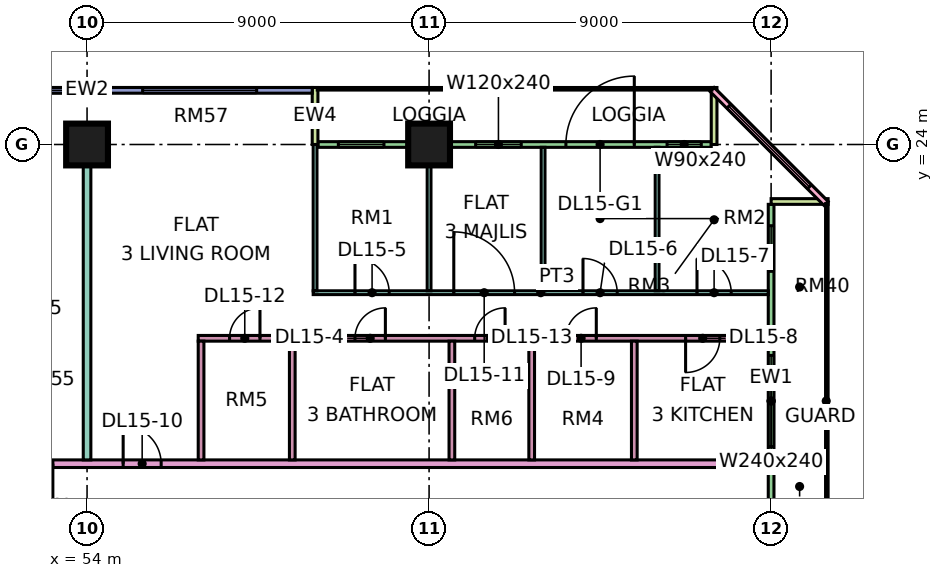
"""IFC4 building model, lengths in metres.
Left out: names, types, materials, properties, quantities, classifications, styles, units other than length and angle.
Written with IfcOpenShell. Run it as: python <this file> out.ifc"""

import sys

from ifc_helpers import new_model, si_unit, direction, frame, frame_2d, origin, origin_2d, place, context, subcontext, project, spatial, rectangle, extrude, element, fill, save


model = new_model("IFC4")
c1 = context("Model", 3, precision=1e-05, world=origin(), true_north=direction((0.0, 1.0)))
c2 = subcontext(c1, "Body", "Model", "MODEL_VIEW")
j1 = project(units=[si_unit("LENGTHUNIT", "METRE"), si_unit("PLANEANGLEUNIT", "RADIAN")], contexts=[c1])
p1 = place(None, origin())
s1 = spatial("IfcSite", under=j1, at=p1, CompositionType="ELEMENT")
p2 = place(p1, origin())
s2 = spatial("IfcBuilding", under=s1, at=p2, CompositionType="ELEMENT")
p3 = place(p2, frame((0.0, 0.0, 71.4)))
s3 = spatial("IfcBuildingStorey", under=s2, at=p3, CompositionType="ELEMENT", Elevation=71.4)
for number, where, z_axis, x_axis in (
    (1, (54.0, 24.0, 0.0), (0.0, 0.0, 1.0), (1.0, 0.0, 0.0)),
    (2, (63.0, 24.0, 0.0), (0.0, 0.0, 1.0), (1.0, 0.0, 0.0)),
):
    element("IfcColumn", number, at=place(p3, frame(where, z_axis=z_axis, x_axis=x_axis)), inside=s3, PredefinedType="COLUMN", context=c2, shape_type="SweptSolid", body=[
        extrude(rectangle(XDim=1.1, YDim=1.1, at=origin_2d()), origin(), (0.0, 0.0, 1.0), 3.75),
    ])
p4 = place(p3, frame((70.425, 24.0, 0.0), z_axis=(0.0, 0.0, 1.0), x_axis=(-1.0, 0.0, 0.0)))
e3 = element("IfcWall", 3, at=p4, inside=s3, PredefinedType="SOLIDWALL", context=c2, shape_type="SweptSolid", body=[
    extrude(rectangle(XDim=10.35, YDim=0.15, at=frame_2d((5.175, 0.0))), origin(), (0.0, 0.0, 1.0), 3.35),
])
p5 = place(p4, frame((0.262, 0.0, 0.45)))
e4 = element("IfcOpeningElement", 4, at=p5, cuts=e3, PredefinedType="OPENING", context=c2, shape_type="SweptSolid", body=[
    extrude(rectangle(XDim=0.9, YDim=2.4, at=frame_2d((0.45, 1.2))), frame((0.0, 0.085, 0.0), z_axis=(0.0, -1.0, 0.0), x_axis=(1.0, 0.0, 0.0)), (0.0, 0.0, 1.0), 0.17),
])
p6 = place(p4, frame((2.025, 0.0, 0.0)))
e5 = element("IfcOpeningElement", 5, at=p6, cuts=e3, PredefinedType="OPENING", context=c2, shape_type="SweptSolid", body=[
    extrude(rectangle(XDim=1.8, YDim=2.4, at=frame_2d((0.9, 1.2))), frame((0.0, 0.085, 0.0), z_axis=(0.0, -1.0, 0.0), x_axis=(1.0, 0.0, 0.0)), (0.0, 0.0, 1.0), 0.17),
])
p7 = place(p4, frame((5.0, 0.0, 0.45)))
e6 = element("IfcOpeningElement", 6, at=p7, cuts=e3, PredefinedType="OPENING", context=c2, shape_type="SweptSolid", body=[
    extrude(rectangle(XDim=1.2, YDim=2.4, at=frame_2d((0.6, 1.2))), frame((0.0, 0.085, 0.0), z_axis=(0.0, -1.0, 0.0), x_axis=(1.0, 0.0, 0.0)), (0.0, 0.0, 1.0), 0.17),
])
p8 = place(p4, frame((8.613, 0.0, 0.45)))
e7 = element("IfcOpeningElement", 7, at=p8, cuts=e3, PredefinedType="OPENING", context=c2, shape_type="SweptSolid", body=[
    extrude(rectangle(XDim=1.2, YDim=2.4, at=frame_2d((0.6, 1.2))), frame((0.0, 0.085, 0.0), z_axis=(0.0, -1.0, 0.0), x_axis=(1.0, 0.0, 0.0)), (0.0, 0.0, 1.0), 0.17),
])
for number, where, z_axis, x_axis in (
    (8, (70.5, 25.5, 0.0), (0.0, 0.0, 1.0), (0.0, -1.0, 0.0)),
    (9, (60.0, 25.5, 0.0), (0.0, 0.0, 1.0), (0.0, -1.0, 0.0)),
):
    element("IfcWall", number, at=place(p3, frame(where, z_axis=z_axis, x_axis=x_axis)), inside=s3, PredefinedType="SOLIDWALL", context=c2, shape_type="SweptSolid", body=[
        extrude(rectangle(XDim=1.5, YDim=0.15, at=frame_2d((0.75, 0.0))), origin(), (0.0, 0.0, 1.0), 3.35),
    ])
p9 = place(p3, frame((59.925, 25.425, 0.0), z_axis=(0.0, 0.0, 1.0), x_axis=(-1.0, 0.0, 0.0)))
e10 = element("IfcWall", 10, at=p9, inside=s3, PredefinedType="SOLIDWALL", context=c2, shape_type="SweptSolid", body=[
    extrude(rectangle(XDim=11.85, YDim=0.15, at=frame_2d((5.925, 0.0))), origin(), (0.0, 0.0, 1.0), 3.35),
])
p10 = place(p9, frame((1.462, 0.0, 0.45)))
e11 = element("IfcOpeningElement", 11, at=p10, cuts=e10, PredefinedType="OPENING", context=c2, shape_type="SweptSolid", body=[
    extrude(rectangle(XDim=3.0, YDim=2.4, at=frame_2d((1.5, 1.2))), frame((0.0, 0.085, 0.0), z_axis=(0.0, -1.0, 0.0), x_axis=(1.0, 0.0, 0.0)), (0.0, 0.0, 1.0), 0.17),
])
p11 = place(p9, frame((6.488, 0.0, 0.45)))
e12 = element("IfcOpeningElement", 12, at=p11, cuts=e10, PredefinedType="OPENING", context=c2, shape_type="SweptSolid", body=[
    extrude(rectangle(XDim=4.8, YDim=2.4, at=frame_2d((2.4, 1.2))), frame((0.0, 0.085, 0.0), z_axis=(0.0, -1.0, 0.0), x_axis=(1.0, 0.0, 0.0)), (0.0, 0.0, 1.0), 0.17),
])
p12 = place(p3, frame((72.0, 12.075, 0.0), z_axis=(0.0, 0.0, 1.0), x_axis=(0.0, 1.0, 0.0)))
e13 = element("IfcWall", 13, at=p12, inside=s3, PredefinedType="SOLIDWALL", context=c2, shape_type="SweptSolid", body=[
    extrude(rectangle(XDim=10.35, YDim=0.15, at=frame_2d((5.175, 0.0))), origin(), (0.0, 0.0, 1.0), 3.35),
])
p13 = place(p12, frame((3.975, 0.0, 0.45)))
e14 = element("IfcOpeningElement", 14, at=p13, cuts=e13, PredefinedType="OPENING", context=c2, shape_type="SweptSolid", body=[
    extrude(rectangle(XDim=2.4, YDim=2.4, at=frame_2d((1.2, 1.2))), frame((0.0, 0.085, 0.0), z_axis=(0.0, -1.0, 0.0), x_axis=(1.0, 0.0, 0.0)), (0.0, 0.0, 1.0), 0.17),
])
p14 = place(p12, frame((8.587, 0.0, 0.45)))
e15 = element("IfcOpeningElement", 15, at=p14, cuts=e13, PredefinedType="OPENING", context=c2, shape_type="SweptSolid", body=[
    extrude(rectangle(XDim=1.2, YDim=2.4, at=frame_2d((0.6, 1.2))), frame((0.0, 0.085, 0.0), z_axis=(0.0, -1.0, 0.0), x_axis=(1.0, 0.0, 0.0)), (0.0, 0.0, 1.0), 0.17),
])
p15 = place(p3, frame((73.5, 22.5, 0.0), z_axis=(0.0, 0.0, 1.0), x_axis=(-1.0, 0.0, 0.0)))
e16 = element("IfcWall", 16, at=p15, inside=s3, PredefinedType="SOLIDWALL", context=c2, shape_type="SweptSolid", body=[
    extrude(rectangle(XDim=1.5, YDim=0.15, at=frame_2d((0.75, 0.0))), origin(), (0.0, 0.0, 1.0), 3.35),
])
p16 = place(p3, frame((73.447, 22.447, 0.0), z_axis=(0.0, 0.0, 1.0), x_axis=(-0.707106781187, 0.707106781187, 0.0)))
e17 = element("IfcWall", 17, at=p16, inside=s3, PredefinedType="SOLIDWALL", context=c2, shape_type="SweptSolid", body=[
    extrude(rectangle(XDim=4.243, YDim=0.15, at=frame_2d((2.121, 0.0))), origin(), (0.0, 0.0, 1.0), 3.35),
])
p17 = place(p16, frame((0.621, 0.0, 0.45)))
e18 = element("IfcOpeningElement", 18, at=p17, cuts=e17, PredefinedType="OPENING", context=c2, shape_type="SweptSolid", body=[
    extrude(rectangle(XDim=3.0, YDim=2.4, at=frame_2d((1.5, 1.2))), frame((0.0, 0.085, 0.0), z_axis=(0.0, -1.0, 0.0), x_axis=(1.0, 0.0, 0.0)), (0.0, 0.0, 1.0), 0.17),
])
p18 = place(p3, frame((51.225, 15.6, 0.0), z_axis=(0.0, 0.0, 1.0), x_axis=(1.0, 0.0, 0.0)))
e19 = element("IfcWall", 19, at=p18, inside=s3, PredefinedType="PARTITIONING", context=c2, shape_type="SweptSolid", body=[
    extrude(rectangle(XDim=20.701, YDim=0.2, at=frame_2d((10.351, 0.0))), origin(), (0.0, 0.0, 1.0), 3.35),
])
p19 = place(p18, frame((3.725, 0.0, 0.0)))
e20 = element("IfcOpeningElement", 20, at=p19, cuts=e19, PredefinedType="OPENING", context=c2, shape_type="SweptSolid", body=[
    extrude(rectangle(XDim=1.0, YDim=2.1, at=frame_2d((0.5, 1.05))), frame((0.0, 0.11, 0.0), z_axis=(0.0, -1.0, 0.0), x_axis=(1.0, 0.0, 0.0)), (0.0, 0.0, 1.0), 0.22),
])
p20 = place(p18, frame((0.875, 0.0, 0.0)))
e21 = element("IfcOpeningElement", 21, at=p20, cuts=e19, PredefinedType="OPENING", context=c2, shape_type="SweptSolid", body=[
    extrude(rectangle(XDim=1.0, YDim=2.1, at=frame_2d((0.5, 1.05))), frame((0.0, 0.11, 0.0), z_axis=(0.0, -1.0, 0.0), x_axis=(1.0, 0.0, 0.0)), (0.0, 0.0, 1.0), 0.22),
])
p21 = place(p3, frame((54.0, 15.7, 0.0), z_axis=(0.0, 0.0, 1.0), x_axis=(0.0, 1.0, 0.0)))
e22 = element("IfcWall", 22, at=p21, inside=s3, PredefinedType="PARTITIONING", context=c2, shape_type="SweptSolid", body=[
    extrude(rectangle(XDim=8.3, YDim=0.2, at=frame_2d((4.15, 0.0))), origin(), (0.0, 0.0, 1.0), 3.35),
])
p22 = place(p3, frame((56.925, 18.9, 0.0), z_axis=(0.0, 0.0, 1.0), x_axis=(1.0, 0.0, 0.0)))
e23 = element("IfcWall", 23, at=p22, inside=s3, PredefinedType="PARTITIONING", context=c2, shape_type="SweptSolid", body=[
    extrude(rectangle(XDim=15.001, YDim=0.15, at=frame_2d((7.5, 0.0))), origin(), (0.0, 0.0, 1.0), 3.35),
])
p23 = place(p22, frame((4.125, 0.0, 0.0)))
e24 = element("IfcOpeningElement", 24, at=p23, cuts=e23, PredefinedType="OPENING", context=c2, shape_type="SweptSolid", body=[
    extrude(rectangle(XDim=0.8, YDim=2.1, at=frame_2d((0.4, 1.05))), frame((0.0, 0.085, 0.0), z_axis=(0.0, -1.0, 0.0), x_axis=(1.0, 0.0, 0.0)), (0.0, 0.0, 1.0), 0.17),
])
p24 = place(p22, frame((12.825, 0.0, 0.0)))
e25 = element("IfcOpeningElement", 25, at=p24, cuts=e23, PredefinedType="OPENING", context=c2, shape_type="SweptSolid", body=[
    extrude(rectangle(XDim=0.9, YDim=2.1, at=frame_2d((0.45, 1.05))), frame((0.0, 0.085, 0.0), z_axis=(0.0, -1.0, 0.0), x_axis=(1.0, 0.0, 0.0)), (0.0, 0.0, 1.0), 0.17),
])
p25 = place(p22, frame((9.675, 0.0, 0.0)))
e26 = element("IfcOpeningElement", 26, at=p25, cuts=e23, PredefinedType="OPENING", context=c2, shape_type="SweptSolid", body=[
    extrude(rectangle(XDim=0.8, YDim=2.1, at=frame_2d((0.4, 1.05))), frame((0.0, 0.085, 0.0), z_axis=(0.0, -1.0, 0.0), x_axis=(1.0, 0.0, 0.0)), (0.0, 0.0, 1.0), 0.17),
])
p26 = place(p22, frame((0.825, 0.0, 0.0)))
e27 = element("IfcOpeningElement", 27, at=p26, cuts=e23, PredefinedType="OPENING", context=c2, shape_type="SweptSolid", body=[
    extrude(rectangle(XDim=0.8, YDim=2.1, at=frame_2d((0.4, 1.05))), frame((0.0, 0.085, 0.0), z_axis=(0.0, -1.0, 0.0), x_axis=(1.0, 0.0, 0.0)), (0.0, 0.0, 1.0), 0.17),
])
p27 = place(p22, frame((7.275, 0.0, 0.0)))
e28 = element("IfcOpeningElement", 28, at=p27, cuts=e23, PredefinedType="OPENING", context=c2, shape_type="SweptSolid", body=[
    extrude(rectangle(XDim=0.8, YDim=2.1, at=frame_2d((0.4, 1.05))), frame((0.0, 0.085, 0.0), z_axis=(0.0, -1.0, 0.0), x_axis=(1.0, 0.0, 0.0)), (0.0, 0.0, 1.0), 0.17),
])
for number, where, z_axis, x_axis in (
    (29, (57.0, 15.7, 0.0), (0.0, 0.0, 1.0), (0.0, 1.0, 0.0)),
    (30, (59.4, 15.7, 0.0), (0.0, 0.0, 1.0), (0.0, 1.0, 0.0)),
):
    element("IfcWall", number, at=place(p3, frame(where, z_axis=z_axis, x_axis=x_axis)), inside=s3, PredefinedType="PARTITIONING", context=c2, shape_type="SweptSolid", body=[
        extrude(rectangle(XDim=3.125, YDim=0.15, at=frame_2d((1.562, 0.0))), origin(), (0.0, 0.0, 1.0), 3.35),
    ])
p28 = place(p3, frame((59.95, 20.1, 0.0), z_axis=(0.0, 0.0, 1.0), x_axis=(1.0, 0.0, 0.0)))
e31 = element("IfcWall", 31, at=p28, inside=s3, PredefinedType="PARTITIONING", context=c2, shape_type="SweptSolid", body=[
    extrude(rectangle(XDim=11.976, YDim=0.1, at=frame_2d((5.988, 0.0))), origin(), (0.0, 0.0, 1.0), 3.35),
])
p29 = place(p28, frame((1.1, 0.0, 0.0)))
e32 = element("IfcOpeningElement", 32, at=p29, cuts=e31, PredefinedType="OPENING", context=c2, shape_type="SweptSolid", body=[
    extrude(rectangle(XDim=0.9, YDim=2.1, at=frame_2d((0.45, 1.05))), frame((0.0, 0.06, 0.0), z_axis=(0.0, -1.0, 0.0), x_axis=(1.0, 0.0, 0.0)), (0.0, 0.0, 1.0), 0.12),
])
p30 = place(p28, frame((7.1, 0.0, 0.0)))
e33 = element("IfcOpeningElement", 33, at=p30, cuts=e31, PredefinedType="OPENING", context=c2, shape_type="SweptSolid", body=[
    extrude(rectangle(XDim=0.9, YDim=2.1, at=frame_2d((0.45, 1.05))), frame((0.0, 0.06, 0.0), z_axis=(0.0, -1.0, 0.0), x_axis=(1.0, 0.0, 0.0)), (0.0, 0.0, 1.0), 0.12),
])
p31 = place(p28, frame((10.1, 0.0, 0.0)))
e34 = element("IfcOpeningElement", 34, at=p31, cuts=e31, PredefinedType="OPENING", context=c2, shape_type="SweptSolid", body=[
    extrude(rectangle(XDim=0.9, YDim=2.1, at=frame_2d((0.45, 1.05))), frame((0.0, 0.06, 0.0), z_axis=(0.0, -1.0, 0.0), x_axis=(1.0, 0.0, 0.0)), (0.0, 0.0, 1.0), 0.12),
])
p32 = place(p28, frame((3.7, 0.0, 0.0)))
e35 = element("IfcOpeningElement", 35, at=p32, cuts=e31, PredefinedType="OPENING", context=c2, shape_type="SweptSolid", body=[
    extrude(rectangle(XDim=1.6, YDim=2.1, at=frame_2d((0.8, 1.05))), frame((0.0, 0.06, 0.0), z_axis=(0.0, -1.0, 0.0), x_axis=(1.0, 0.0, 0.0)), (0.0, 0.0, 1.0), 0.12),
])
p33 = place(p3, frame((60.0, 20.15, 0.0), z_axis=(0.0, 0.0, 1.0), x_axis=(0.0, 1.0, 0.0)))
e36 = element("IfcWall", 36, at=p33, inside=s3, PredefinedType="PARTITIONING", context=c2, shape_type="SweptSolid", body=[
    extrude(rectangle(XDim=3.85, YDim=0.1, at=frame_2d((1.925, 0.0))), origin(), (0.0, 0.0, 1.0), 3.35),
])
p34 = place(p3, frame((63.0, 20.15, 0.0), z_axis=(0.0, 0.0, 1.0), x_axis=(0.0, 1.0, 0.0)))
e37 = element("IfcWall", 37, at=p34, inside=s3, PredefinedType="PARTITIONING", context=c2, shape_type="SweptSolid", body=[
    extrude(rectangle(XDim=3.776, YDim=0.1, at=frame_2d((1.888, 0.0))), origin(), (0.0, 0.0, 1.0), 3.35),
])
for number, where, z_axis, x_axis in (
    (38, (63.6, 15.7, 0.0), (0.0, 0.0, 1.0), (0.0, 1.0, 0.0)),
    (39, (65.7, 15.7, 0.0), (0.0, 0.0, 1.0), (0.0, 1.0, 0.0)),
):
    element("IfcWall", number, at=place(p3, frame(where, z_axis=z_axis, x_axis=x_axis)), inside=s3, PredefinedType="PARTITIONING", context=c2, shape_type="SweptSolid", body=[
        extrude(rectangle(XDim=3.125, YDim=0.15, at=frame_2d((1.562, 0.0))), origin(), (0.0, 0.0, 1.0), 3.35),
    ])
p35 = place(p3, frame((66.0, 20.15, 0.0), z_axis=(0.0, 0.0, 1.0), x_axis=(0.0, 1.0, 0.0)))
e40 = element("IfcWall", 40, at=p35, inside=s3, PredefinedType="PARTITIONING", context=c2, shape_type="SweptSolid", body=[
    extrude(rectangle(XDim=3.776, YDim=0.1, at=frame_2d((1.888, 0.0))), origin(), (0.0, 0.0, 1.0), 3.35),
])
p36 = place(p3, frame((68.4, 15.7, 0.0), z_axis=(0.0, 0.0, 1.0), x_axis=(0.0, 1.0, 0.0)))
e41 = element("IfcWall", 41, at=p36, inside=s3, PredefinedType="PARTITIONING", context=c2, shape_type="SweptSolid", body=[
    extrude(rectangle(XDim=3.125, YDim=0.15, at=frame_2d((1.562, 0.0))), origin(), (0.0, 0.0, 1.0), 3.35),
])
p37 = place(p3, frame((69.0, 20.15, 0.0), z_axis=(0.0, 0.0, 1.0), x_axis=(0.0, 1.0, 0.0)))
e42 = element("IfcWall", 42, at=p37, inside=s3, PredefinedType="PARTITIONING", context=c2, shape_type="SweptSolid", body=[
    extrude(rectangle(XDim=3.776, YDim=0.1, at=frame_2d((1.888, 0.0))), origin(), (0.0, 0.0, 1.0), 3.35),
])
p38 = place(p5, origin())
e43 = element("IfcWindow", 43, at=p38, inside=s3, PartitioningType="SINGLE_PANEL", PredefinedType="WINDOW", context=c2, shape_type="SweptSolid", body=[
    extrude(rectangle(XDim=0.9, YDim=2.4, at=frame_2d((0.45, 1.2))), frame((0.0, 0.03, 0.0), z_axis=(0.0, -1.0, 0.0), x_axis=(1.0, 0.0, 0.0)), (0.0, 0.0, 1.0), 0.06),
])
fill(e4, e43)
p39 = place(p6, frame((1.8, 0.0, 0.0), z_axis=(0.0, 0.0, 1.0), x_axis=(-1.0, 0.0, 0.0)))
e44 = element("IfcDoor", 44, at=p39, inside=s3, OperationType="DOUBLE_DOOR_SINGLE_SWING", PredefinedType="DOOR", context=c2, shape_type="SweptSolid", body=[
    extrude(rectangle(XDim=1.8, YDim=2.4, at=frame_2d((0.9, 1.2))), frame((0.0, 0.025, 0.0), z_axis=(0.0, -1.0, 0.0), x_axis=(1.0, 0.0, 0.0)), (0.0, 0.0, 1.0), 0.05),
])
fill(e5, e44)
p40 = place(p7, origin())
e45 = element("IfcWindow", 45, at=p40, inside=s3, PartitioningType="SINGLE_PANEL", PredefinedType="WINDOW", context=c2, shape_type="SweptSolid", body=[
    extrude(rectangle(XDim=1.2, YDim=2.4, at=frame_2d((0.6, 1.2))), frame((0.0, 0.03, 0.0), z_axis=(0.0, -1.0, 0.0), x_axis=(1.0, 0.0, 0.0)), (0.0, 0.0, 1.0), 0.06),
])
fill(e6, e45)
p41 = place(p8, origin())
e46 = element("IfcWindow", 46, at=p41, inside=s3, PartitioningType="SINGLE_PANEL", PredefinedType="WINDOW", context=c2, shape_type="SweptSolid", body=[
    extrude(rectangle(XDim=1.2, YDim=2.4, at=frame_2d((0.6, 1.2))), frame((0.0, 0.03, 0.0), z_axis=(0.0, -1.0, 0.0), x_axis=(1.0, 0.0, 0.0)), (0.0, 0.0, 1.0), 0.06),
])
fill(e7, e46)
p42 = place(p10, origin())
e47 = element("IfcWindow", 47, at=p42, inside=s3, PartitioningType="SINGLE_PANEL", PredefinedType="WINDOW", context=c2, shape_type="SweptSolid", body=[
    extrude(rectangle(XDim=3.0, YDim=2.4, at=frame_2d((1.5, 1.2))), frame((0.0, 0.03, 0.0), z_axis=(0.0, -1.0, 0.0), x_axis=(1.0, 0.0, 0.0)), (0.0, 0.0, 1.0), 0.06),
])
fill(e11, e47)
p43 = place(p11, origin())
e48 = element("IfcWindow", 48, at=p43, inside=s3, PartitioningType="SINGLE_PANEL", PredefinedType="WINDOW", context=c2, shape_type="SweptSolid", body=[
    extrude(rectangle(XDim=4.8, YDim=2.4, at=frame_2d((2.4, 1.2))), frame((0.0, 0.03, 0.0), z_axis=(0.0, -1.0, 0.0), x_axis=(1.0, 0.0, 0.0)), (0.0, 0.0, 1.0), 0.06),
])
fill(e12, e48)
p44 = place(p13, origin())
e49 = element("IfcWindow", 49, at=p44, inside=s3, PartitioningType="SINGLE_PANEL", PredefinedType="WINDOW", context=c2, shape_type="SweptSolid", body=[
    extrude(rectangle(XDim=2.4, YDim=2.4, at=frame_2d((1.2, 1.2))), frame((0.0, 0.03, 0.0), z_axis=(0.0, -1.0, 0.0), x_axis=(1.0, 0.0, 0.0)), (0.0, 0.0, 1.0), 0.06),
])
fill(e14, e49)
p45 = place(p14, origin())
e50 = element("IfcWindow", 50, at=p45, inside=s3, PartitioningType="SINGLE_PANEL", PredefinedType="WINDOW", context=c2, shape_type="SweptSolid", body=[
    extrude(rectangle(XDim=1.2, YDim=2.4, at=frame_2d((0.6, 1.2))), frame((0.0, 0.03, 0.0), z_axis=(0.0, -1.0, 0.0), x_axis=(1.0, 0.0, 0.0)), (0.0, 0.0, 1.0), 0.06),
])
fill(e15, e50)
p46 = place(p17, origin())
e51 = element("IfcWindow", 51, at=p46, inside=s3, PartitioningType="SINGLE_PANEL", PredefinedType="WINDOW", context=c2, shape_type="SweptSolid", body=[
    extrude(rectangle(XDim=3.0, YDim=2.4, at=frame_2d((1.5, 1.2))), frame((0.0, 0.03, 0.0), z_axis=(0.0, -1.0, 0.0), x_axis=(1.0, 0.0, 0.0)), (0.0, 0.0, 1.0), 0.06),
])
fill(e18, e51)
p47 = place(p23, frame((0.8, 0.0, 0.0), z_axis=(0.0, 0.0, 1.0), x_axis=(-1.0, 0.0, 0.0)))
e52 = element("IfcDoor", 52, at=p47, inside=s3, OperationType="SINGLE_SWING_RIGHT", PredefinedType="DOOR", context=c2, shape_type="SweptSolid", body=[
    extrude(rectangle(XDim=0.8, YDim=2.1, at=frame_2d((0.4, 1.05))), frame((0.0, 0.025, 0.0), z_axis=(0.0, -1.0, 0.0), x_axis=(1.0, 0.0, 0.0)), (0.0, 0.0, 1.0), 0.05),
])
fill(e24, e52)
p48 = place(p29, origin())
e53 = element("IfcDoor", 53, at=p48, inside=s3, OperationType="SINGLE_SWING_LEFT", PredefinedType="DOOR", context=c2, shape_type="SweptSolid", body=[
    extrude(rectangle(XDim=0.9, YDim=2.1, at=frame_2d((0.45, 1.05))), frame((0.0, 0.025, 0.0), z_axis=(0.0, -1.0, 0.0), x_axis=(1.0, 0.0, 0.0)), (0.0, 0.0, 1.0), 0.05),
])
fill(e32, e53)
p49 = place(p30, origin())
e54 = element("IfcDoor", 54, at=p49, inside=s3, OperationType="SINGLE_SWING_LEFT", PredefinedType="DOOR", context=c2, shape_type="SweptSolid", body=[
    extrude(rectangle(XDim=0.9, YDim=2.1, at=frame_2d((0.45, 1.05))), frame((0.0, 0.025, 0.0), z_axis=(0.0, -1.0, 0.0), x_axis=(1.0, 0.0, 0.0)), (0.0, 0.0, 1.0), 0.05),
])
fill(e33, e54)
p50 = place(p31, origin())
e55 = element("IfcDoor", 55, at=p50, inside=s3, OperationType="SINGLE_SWING_LEFT", PredefinedType="DOOR", context=c2, shape_type="SweptSolid", body=[
    extrude(rectangle(XDim=0.9, YDim=2.1, at=frame_2d((0.45, 1.05))), frame((0.0, 0.025, 0.0), z_axis=(0.0, -1.0, 0.0), x_axis=(1.0, 0.0, 0.0)), (0.0, 0.0, 1.0), 0.05),
])
fill(e34, e55)
p51 = place(p24, frame((0.9, 0.0, 0.0), z_axis=(0.0, 0.0, 1.0), x_axis=(-1.0, 0.0, 0.0)))
e56 = element("IfcDoor", 56, at=p51, inside=s3, OperationType="SINGLE_SWING_LEFT", PredefinedType="DOOR", context=c2, shape_type="SweptSolid", body=[
    extrude(rectangle(XDim=0.9, YDim=2.1, at=frame_2d((0.45, 1.05))), frame((0.0, 0.025, 0.0), z_axis=(0.0, -1.0, 0.0), x_axis=(1.0, 0.0, 0.0)), (0.0, 0.0, 1.0), 0.05),
])
fill(e25, e56)
p52 = place(p25, frame((0.8, 0.0, 0.0), z_axis=(0.0, 0.0, 1.0), x_axis=(-1.0, 0.0, 0.0)))
e57 = element("IfcDoor", 57, at=p52, inside=s3, OperationType="SINGLE_SWING_RIGHT", PredefinedType="DOOR", context=c2, shape_type="SweptSolid", body=[
    extrude(rectangle(XDim=0.8, YDim=2.1, at=frame_2d((0.4, 1.05))), frame((0.0, 0.025, 0.0), z_axis=(0.0, -1.0, 0.0), x_axis=(1.0, 0.0, 0.0)), (0.0, 0.0, 1.0), 0.05),
])
fill(e26, e57)
p53 = place(p19, origin())
e58 = element("IfcDoor", 58, at=p53, inside=s3, OperationType="SINGLE_SWING_LEFT", PredefinedType="DOOR", context=c2, shape_type="SweptSolid", body=[
    extrude(rectangle(XDim=1.0, YDim=2.1, at=frame_2d((0.5, 1.05))), frame((0.0, 0.025, 0.0), z_axis=(0.0, -1.0, 0.0), x_axis=(1.0, 0.0, 0.0)), (0.0, 0.0, 1.0), 0.05),
])
fill(e20, e58)
p54 = place(p32, origin())
e59 = element("IfcDoor", 59, at=p54, inside=s3, OperationType="DOUBLE_DOOR_SINGLE_SWING", PredefinedType="DOOR", context=c2, shape_type="SweptSolid", body=[
    extrude(rectangle(XDim=1.6, YDim=2.1, at=frame_2d((0.8, 1.05))), frame((0.0, 0.025, 0.0), z_axis=(0.0, -1.0, 0.0), x_axis=(1.0, 0.0, 0.0)), (0.0, 0.0, 1.0), 0.05),
])
fill(e35, e59)
p55 = place(p26, frame((0.8, 0.0, 0.0), z_axis=(0.0, 0.0, 1.0), x_axis=(-1.0, 0.0, 0.0)))
e60 = element("IfcDoor", 60, at=p55, inside=s3, OperationType="SINGLE_SWING_RIGHT", PredefinedType="DOOR", context=c2, shape_type="SweptSolid", body=[
    extrude(rectangle(XDim=0.8, YDim=2.1, at=frame_2d((0.4, 1.05))), frame((0.0, 0.025, 0.0), z_axis=(0.0, -1.0, 0.0), x_axis=(1.0, 0.0, 0.0)), (0.0, 0.0, 1.0), 0.05),
])
fill(e27, e60)
p56 = place(p27, frame((0.8, 0.0, 0.0), z_axis=(0.0, 0.0, 1.0), x_axis=(-1.0, 0.0, 0.0)))
e61 = element("IfcDoor", 61, at=p56, inside=s3, OperationType="SINGLE_SWING_RIGHT", PredefinedType="DOOR", context=c2, shape_type="SweptSolid", body=[
    extrude(rectangle(XDim=0.8, YDim=2.1, at=frame_2d((0.4, 1.05))), frame((0.0, 0.025, 0.0), z_axis=(0.0, -1.0, 0.0), x_axis=(1.0, 0.0, 0.0)), (0.0, 0.0, 1.0), 0.05),
])
fill(e28, e61)
p57 = place(p20, origin())
e62 = element("IfcDoor", 62, at=p57, inside=s3, OperationType="SINGLE_SWING_RIGHT", PredefinedType="DOOR", context=c2, shape_type="SweptSolid", body=[
    extrude(rectangle(XDim=1.0, YDim=2.1, at=frame_2d((0.5, 1.05))), frame((0.0, 0.025, 0.0), z_axis=(0.0, -1.0, 0.0), x_axis=(1.0, 0.0, 0.0)), (0.0, 0.0, 1.0), 0.05),
])
fill(e21, e62)
save(model, sys.argv[1])
